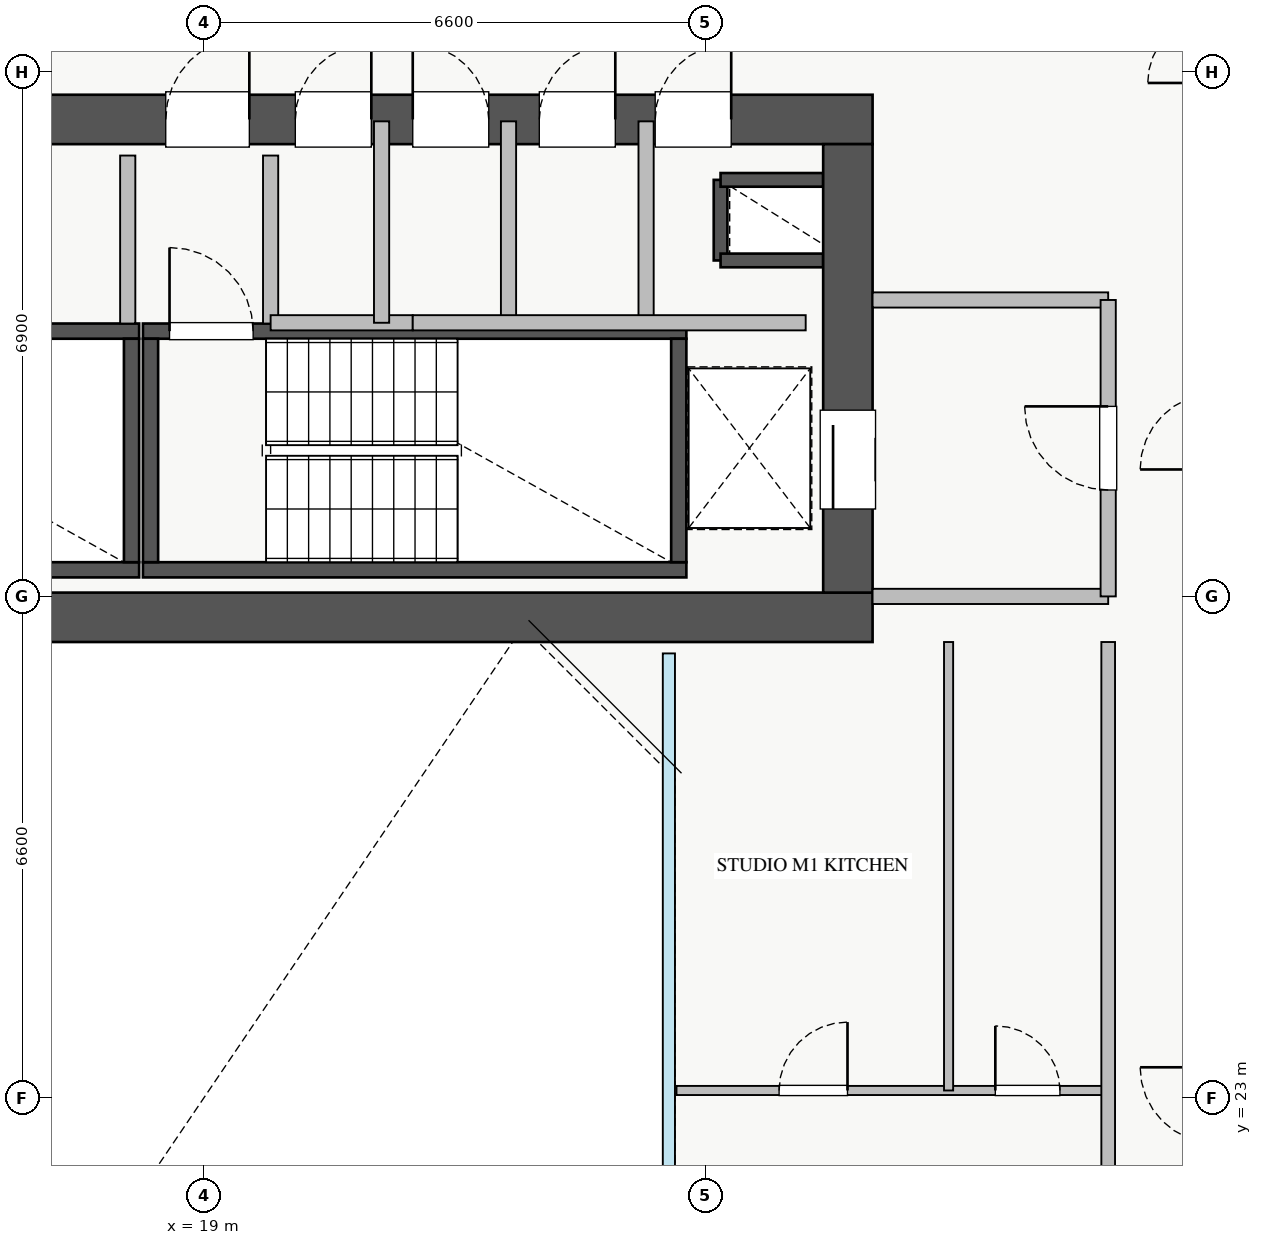
"""IFC4 building model, lengths in metres.
Left out: names, types, materials, properties, quantities, classifications, styles, units other than length and angle.
Written with IfcOpenShell. Run it as: python <this file> out.ifc"""

import sys

from ifc_helpers import new_model, si_unit, direction, frame, frame_2d, origin, place, context, subcontext, project, spatial, rectangle, extrude, source, transform, mapped, element, fill, save


model = new_model("IFC4")
c1 = context("Model", 3, precision=1e-05, world=origin(), true_north=direction((0.0, 1.0)))
c2 = subcontext(c1, "Body", "Model", "MODEL_VIEW")
j1 = project(units=[si_unit("LENGTHUNIT", "METRE"), si_unit("PLANEANGLEUNIT", "RADIAN")], contexts=[c1])
p1 = place(None, origin())
s1 = spatial("IfcSite", under=j1, at=p1, CompositionType="ELEMENT")
p2 = place(p1, origin())
s2 = spatial("IfcBuilding", under=s1, at=p2, CompositionType="ELEMENT")
p3 = place(p2, frame((0.0, 0.0, 173.0)))
s3 = spatial("IfcBuildingStorey", under=s2, at=p3, CompositionType="ELEMENT", Elevation=173.0)
p4 = place(p3, frame((25.8, 34.02, 0.0), z_axis=(0.0, 0.0, 1.0), x_axis=(0.0, 1.0, 0.0)))
e1 = element("IfcWall", 1, at=p4, inside=s3, PredefinedType="SHEAR", context=c2, shape_type="SweptSolid", body=[
    extrude(rectangle(XDim=1.06, YDim=0.18, at=frame_2d((0.53, 0.0))), origin(), (0.0, 0.0, 1.0), 3.0),
])
for number, where, z_axis, x_axis in (
    (2, (25.8, 35.08, 0.0), (0.0, 0.0, 1.0), (1.0, 0.0, 0.0)),
    (3, (25.8, 34.02, 0.0), (0.0, 0.0, 1.0), (1.0, 0.0, 0.0)),
):
    element("IfcWall", number, at=place(p3, frame(where, z_axis=z_axis, x_axis=x_axis)), inside=s3, PredefinedType="SHEAR", context=c2, shape_type="SweptSolid", body=[
        extrude(rectangle(XDim=1.35, YDim=0.18, at=frame_2d((0.675, 0.0))), origin(), (0.0, 0.0, 1.0), 3.0),
    ])
p5 = place(p3, frame((10.85, 29.95, 0.0), z_axis=(0.0, 0.0, 1.0), x_axis=(1.0, 0.0, 0.0)))
e4 = element("IfcWall", 4, at=p5, inside=s3, PredefinedType="SHEAR", context=c2, shape_type="SweptSolid", body=[
    extrude(rectangle(XDim=7.3, YDim=0.2, at=frame_2d((3.65, 0.0))), origin(), (0.0, 0.0, 1.0), 3.25),
])
p6 = place(p3, frame((10.85, 33.09, 0.0), z_axis=(0.0, 0.0, 1.0), x_axis=(1.0, 0.0, 0.0)))
e5 = element("IfcWall", 5, at=p6, inside=s3, PredefinedType="SHEAR", context=c2, shape_type="SweptSolid", body=[
    extrude(rectangle(XDim=7.3, YDim=0.2, at=frame_2d((3.65, 0.0))), origin(), (0.0, 0.0, 1.0), 3.25),
])
p7 = place(p6, frame((0.35, 0.0, 0.0)))
e6 = element("IfcOpeningElement", 6, at=p7, cuts=e5, PredefinedType="OPENING", context=c2, shape_type="SweptSolid", body=[
    extrude(rectangle(XDim=1.1, YDim=2.05, at=frame_2d((0.55, 1.025))), frame((0.0, 0.11, 0.0), z_axis=(0.0, -1.0, 0.0), x_axis=(1.0, 0.0, 0.0)), (0.0, 0.0, 1.0), 0.22),
])
p8 = place(p3, frame((18.05, 30.05, 0.0), z_axis=(0.0, 0.0, 1.0), x_axis=(0.0, 1.0, 0.0)))
e7 = element("IfcWall", 7, at=p8, inside=s3, PredefinedType="SHEAR", context=c2, shape_type="SweptSolid", body=[
    extrude(rectangle(XDim=2.94, YDim=0.2, at=frame_2d((1.47, 0.0))), origin(), (0.0, 0.0, 1.0), 3.25),
])
p9 = place(p3, frame((18.2, 29.95, 0.0), z_axis=(0.0, 0.0, 1.0), x_axis=(1.0, 0.0, 0.0)))
e8 = element("IfcWall", 8, at=p9, inside=s3, PredefinedType="SHEAR", context=c2, shape_type="SweptSolid", body=[
    extrude(rectangle(XDim=7.15, YDim=0.2, at=frame_2d((3.575, 0.0))), origin(), (0.0, 0.0, 1.0), 3.25),
])
p10 = place(p3, frame((18.2, 33.09, 0.0), z_axis=(0.0, 0.0, 1.0), x_axis=(1.0, 0.0, 0.0)))
e9 = element("IfcWall", 9, at=p10, inside=s3, PredefinedType="SHEAR", context=c2, shape_type="SweptSolid", body=[
    extrude(rectangle(XDim=7.15, YDim=0.2, at=frame_2d((3.575, 0.0))), origin(), (0.0, 0.0, 1.0), 3.25),
])
p11 = place(p10, frame((0.35, 0.0, 0.0)))
e10 = element("IfcOpeningElement", 10, at=p11, cuts=e9, PredefinedType="OPENING", context=c2, shape_type="SweptSolid", body=[
    extrude(rectangle(XDim=1.1, YDim=2.05, at=frame_2d((0.55, 1.025))), frame((0.0, 0.11, 0.0), z_axis=(0.0, -1.0, 0.0), x_axis=(1.0, 0.0, 0.0)), (0.0, 0.0, 1.0), 0.22),
])
for number, where, z_axis, x_axis in (
    (11, (18.3, 30.05, 0.0), (0.0, 0.0, 1.0), (0.0, 1.0, 0.0)),
    (12, (25.25, 30.05, 0.0), (0.0, 0.0, 1.0), (0.0, 1.0, 0.0)),
):
    element("IfcWall", number, at=place(p3, frame(where, z_axis=z_axis, x_axis=x_axis)), inside=s3, PredefinedType="SHEAR", context=c2, shape_type="SweptSolid", body=[
        extrude(rectangle(XDim=2.94, YDim=0.2, at=frame_2d((1.47, 0.0))), origin(), (0.0, 0.0, 1.0), 3.25),
    ])
p12 = place(p3, frame((10.2, 29.325, 0.0), z_axis=(0.0, 0.0, 1.0), x_axis=(1.0, 0.0, 0.0)))
e13 = element("IfcWall", 13, at=p12, inside=s3, PredefinedType="SHEAR", context=c2, shape_type="SweptSolid", body=[
    extrude(rectangle(XDim=17.6, YDim=0.65, at=frame_2d((8.8, 0.0))), origin(), (0.0, 0.0, 1.0), 3.25),
])
p13 = place(p3, frame((10.2, 35.875, 0.0), z_axis=(0.0, 0.0, 1.0), x_axis=(1.0, 0.0, 0.0)))
e14 = element("IfcWall", 14, at=p13, inside=s3, PredefinedType="SHEAR", context=c2, shape_type="SweptSolid", body=[
    extrude(rectangle(XDim=17.6, YDim=0.65, at=frame_2d((8.8, 0.0))), origin(), (0.0, 0.0, 1.0), 3.25),
])
p14 = place(p13, frame((1.15, 0.0, 0.0)))
e15 = element("IfcOpeningElement", 15, at=p14, cuts=e14, PredefinedType="OPENING", context=c2, shape_type="SweptSolid", body=[
    extrude(rectangle(XDim=1.1, YDim=2.05, at=frame_2d((0.55, 1.025))), frame((0.0, 0.335, 0.0), z_axis=(0.0, -1.0, 0.0), x_axis=(1.0, 0.0, 0.0)), (0.0, 0.0, 1.0), 0.67),
])
p15 = place(p13, frame((8.3, 0.0, 0.0)))
e16 = element("IfcOpeningElement", 16, at=p15, cuts=e14, PredefinedType="OPENING", context=c2, shape_type="SweptSolid", body=[
    extrude(rectangle(XDim=1.1, YDim=2.05, at=frame_2d((0.55, 1.025))), frame((0.0, 0.335, 0.0), z_axis=(0.0, -1.0, 0.0), x_axis=(1.0, 0.0, 0.0)), (0.0, 0.0, 1.0), 0.67),
])
p16 = place(p13, frame((4.9, 0.0, 0.0)))
e17 = element("IfcOpeningElement", 17, at=p16, cuts=e14, PredefinedType="OPENING", context=c2, shape_type="SweptSolid", body=[
    extrude(rectangle(XDim=1.1, YDim=2.05, at=frame_2d((0.55, 1.025))), frame((0.0, 0.335, 0.0), z_axis=(0.0, -1.0, 0.0), x_axis=(1.0, 0.0, 0.0)), (0.0, 0.0, 1.0), 0.67),
])
p17 = place(p13, frame((14.74, 0.0, 0.0)))
e18 = element("IfcOpeningElement", 18, at=p17, cuts=e14, PredefinedType="OPENING", context=c2, shape_type="SweptSolid", body=[
    extrude(rectangle(XDim=1.0, YDim=2.05, at=frame_2d((0.5, 1.025))), frame((0.0, 0.335, 0.0), z_axis=(0.0, -1.0, 0.0), x_axis=(1.0, 0.0, 0.0)), (0.0, 0.0, 1.0), 0.67),
])
p18 = place(p13, frame((10.005, 0.0, 0.0)))
e19 = element("IfcOpeningElement", 19, at=p18, cuts=e14, PredefinedType="OPENING", context=c2, shape_type="SweptSolid", body=[
    extrude(rectangle(XDim=1.0, YDim=2.05, at=frame_2d((0.5, 1.025))), frame((0.0, 0.335, 0.0), z_axis=(0.0, -1.0, 0.0), x_axis=(1.0, 0.0, 0.0)), (0.0, 0.0, 1.0), 0.67),
])
p19 = place(p13, frame((11.55, 0.0, 0.0)))
e20 = element("IfcOpeningElement", 20, at=p19, cuts=e14, PredefinedType="OPENING", context=c2, shape_type="SweptSolid", body=[
    extrude(rectangle(XDim=1.0, YDim=2.05, at=frame_2d((0.5, 1.025))), frame((0.0, 0.335, 0.0), z_axis=(0.0, -1.0, 0.0), x_axis=(1.0, 0.0, 0.0)), (0.0, 0.0, 1.0), 0.67),
])
p20 = place(p13, frame((13.215, 0.0, 0.0)))
e21 = element("IfcOpeningElement", 21, at=p20, cuts=e14, PredefinedType="OPENING", context=c2, shape_type="SweptSolid", body=[
    extrude(rectangle(XDim=1.0, YDim=2.05, at=frame_2d((0.5, 1.025))), frame((0.0, 0.335, 0.0), z_axis=(0.0, -1.0, 0.0), x_axis=(1.0, 0.0, 0.0)), (0.0, 0.0, 1.0), 0.67),
])
p21 = place(p3, frame((27.475, 29.65, 0.0), z_axis=(0.0, 0.0, 1.0), x_axis=(0.0, 1.0, 0.0)))
e22 = element("IfcWall", 22, at=p21, inside=s3, PredefinedType="SHEAR", context=c2, shape_type="SweptSolid", body=[
    extrude(rectangle(XDim=5.9, YDim=0.65, at=frame_2d((2.95, 0.0))), origin(), (0.0, 0.0, 1.0), 3.25),
])
p22 = place(p21, frame((1.1, 0.0, 0.0)))
e23 = element("IfcOpeningElement", 23, at=p22, cuts=e22, PredefinedType="OPENING", context=c2, shape_type="SweptSolid", body=[
    extrude(rectangle(XDim=1.3, YDim=2.05, at=frame_2d((0.65, 1.025))), frame((0.0, 0.335, 0.0), z_axis=(0.0, -1.0, 0.0), x_axis=(1.0, 0.0, 0.0)), (0.0, 0.0, 1.0), 0.67),
])
for number, where, z_axis, x_axis in (
    (24, (27.8, 29.6, 0.0), (0.0, 0.0, 1.0), (1.0, 0.0, 0.0)),
    (25, (27.8, 33.5, 0.0), (0.0, 0.0, 1.0), (1.0, 0.0, 0.0)),
):
    element("IfcWall", number, at=place(p3, frame(where, z_axis=z_axis, x_axis=x_axis)), inside=s3, PredefinedType="PARTITIONING", context=c2, shape_type="SweptSolid", body=[
        extrude(rectangle(XDim=3.1, YDim=0.2, at=frame_2d((1.55, 0.0))), origin(), (0.0, 0.0, 1.0), 3.0),
    ])
p23 = place(p3, frame((30.9, 29.6, 0.0), z_axis=(0.0, 0.0, 1.0), x_axis=(0.0, 1.0, 0.0)))
e26 = element("IfcWall", 26, at=p23, inside=s3, PredefinedType="PARTITIONING", context=c2, shape_type="SweptSolid", body=[
    extrude(rectangle(XDim=3.9, YDim=0.2, at=frame_2d((1.95, 0.0))), origin(), (0.0, 0.0, 1.0), 3.0),
])
p24 = place(p23, frame((1.4, 0.0, 0.0)))
e27 = element("IfcOpeningElement", 27, at=p24, cuts=e26, PredefinedType="OPENING", context=c2, shape_type="SweptSolid", body=[
    extrude(rectangle(XDim=1.1, YDim=2.05, at=frame_2d((0.55, 1.025))), frame((0.0, 0.11, 0.0), z_axis=(0.0, -1.0, 0.0), x_axis=(1.0, 0.0, 0.0)), (0.0, 0.0, 1.0), 0.22),
])
for number, where, z_axis, x_axis in (
    (28, (18.0, 33.19, 0.0), (0.0, 0.0, 1.0), (0.0, 1.0, 0.0)),
    (29, (19.88, 33.19, 0.0), (0.0, 0.0, 1.0), (0.0, 1.0, 0.0)),
):
    element("IfcWall", number, at=place(p3, frame(where, z_axis=z_axis, x_axis=x_axis)), inside=s3, PredefinedType="PARTITIONING", context=c2, shape_type="SweptSolid", body=[
        extrude(rectangle(XDim=2.21, YDim=0.2, at=frame_2d((1.105, 0.0))), origin(), (0.0, 0.0, 1.0), 3.0),
    ])
p25 = place(p3, frame((24.82, 33.2, 0.0), z_axis=(0.0, 0.0, 1.0), x_axis=(0.0, 1.0, 0.0)))
e30 = element("IfcWall", 30, at=p25, inside=s3, PredefinedType="PARTITIONING", context=c2, shape_type="SweptSolid", body=[
    extrude(rectangle(XDim=2.65, YDim=0.2, at=frame_2d((1.325, 0.0))), origin(), (0.0, 0.0, 1.0), 3.0),
])
p26 = place(p3, frame((19.88, 33.2, 0.0), z_axis=(0.0, 0.0, 1.0), x_axis=(1.0, 0.0, 0.0)))
e31 = element("IfcWall", 31, at=p26, inside=s3, PredefinedType="PARTITIONING", context=c2, shape_type="SweptSolid", body=[
    extrude(rectangle(XDim=1.87, YDim=0.2, at=frame_2d((0.935, 0.0))), origin(), (0.0, 0.0, 1.0), 3.0),
])
for number, where, z_axis, x_axis in (
    (32, (21.34, 33.2, 0.0), (0.0, 0.0, 1.0), (0.0, 1.0, 0.0)),
    (33, (23.01, 33.2, 0.0), (0.0, 0.0, 1.0), (0.0, 1.0, 0.0)),
):
    element("IfcWall", number, at=place(p3, frame(where, z_axis=z_axis, x_axis=x_axis)), inside=s3, PredefinedType="PARTITIONING", context=c2, shape_type="SweptSolid", body=[
        extrude(rectangle(XDim=2.65, YDim=0.2, at=frame_2d((1.325, 0.0))), origin(), (0.0, 0.0, 1.0), 3.0),
    ])
p27 = place(p3, frame((21.75, 33.2, 0.0), z_axis=(0.0, 0.0, 1.0), x_axis=(1.0, 0.0, 0.0)))
e34 = element("IfcWall", 34, at=p27, inside=s3, PredefinedType="PARTITIONING", context=c2, shape_type="SweptSolid", body=[
    extrude(rectangle(XDim=5.17, YDim=0.2, at=frame_2d((2.585, 0.0))), origin(), (0.0, 0.0, 1.0), 3.0),
])
p28 = place(p3, frame((25.22, 23.1, 0.0), z_axis=(0.0, 0.0, 1.0), x_axis=(1.0, 0.0, 0.0)))
e35 = element("IfcWall", 35, at=p28, inside=s3, PredefinedType="PLUMBINGWALL", context=c2, shape_type="SweptSolid", body=[
    extrude(rectangle(XDim=5.68, YDim=0.12, at=frame_2d((2.84, 0.0))), origin(), (0.0, 0.0, 1.0), 3.0),
])
p29 = place(p28, frame((1.35, 0.0, 0.0)))
e36 = element("IfcOpeningElement", 36, at=p29, cuts=e35, PredefinedType="OPENING", context=c2, shape_type="SweptSolid", body=[
    extrude(rectangle(XDim=0.9, YDim=2.05, at=frame_2d((0.45, 1.025))), frame((0.0, 0.07, 0.0), z_axis=(0.0, -1.0, 0.0), x_axis=(1.0, 0.0, 0.0)), (0.0, 0.0, 1.0), 0.14),
])
p30 = place(p28, frame((4.195, 0.0, 0.0)))
e37 = element("IfcOpeningElement", 37, at=p30, cuts=e35, PredefinedType="OPENING", context=c2, shape_type="SweptSolid", body=[
    extrude(rectangle(XDim=0.85, YDim=2.05, at=frame_2d((0.425, 1.025))), frame((0.0, 0.07, 0.0), z_axis=(0.0, -1.0, 0.0), x_axis=(1.0, 0.0, 0.0)), (0.0, 0.0, 1.0), 0.14),
])
p31 = place(p3, frame((28.8, 23.1, 0.0), z_axis=(0.0, 0.0, 1.0), x_axis=(0.0, 1.0, 0.0)))
e38 = element("IfcWall", 38, at=p31, inside=s3, PredefinedType="PLUMBINGWALL", context=c2, shape_type="SweptSolid", body=[
    extrude(rectangle(XDim=5.9, YDim=0.12, at=frame_2d((2.95, 0.0))), origin(), (0.0, 0.0, 1.0), 3.0),
])
p32 = place(p3, frame((30.9, 17.0, 0.0), z_axis=(0.0, 0.0, 1.0), x_axis=(0.0, 1.0, 0.0)))
e39 = element("IfcWall", 39, at=p32, inside=s3, PredefinedType="PARTITIONING", context=c2, shape_type="SweptSolid", body=[
    extrude(rectangle(XDim=12.0, YDim=0.18, at=frame_2d((6.0, 0.0))), origin(), (0.0, 0.0, 1.0), 3.0),
])
p33 = place(p32, frame((2.36, 0.0, 0.0)))
e40 = element("IfcOpeningElement", 40, at=p33, cuts=e39, PredefinedType="OPENING", context=c2, shape_type="SweptSolid", body=[
    extrude(rectangle(XDim=1.0, YDim=2.05, at=frame_2d((0.5, 1.025))), frame((0.0, 0.1, 0.0), z_axis=(0.0, -1.0, 0.0), x_axis=(1.0, 0.0, 0.0)), (0.0, 0.0, 1.0), 0.2),
])
m1 = source(origin(), c2, "Body", "SweptSolid", [
    extrude(rectangle(XDim=1.3, YDim=2.05, at=frame_2d((0.65, 1.025))), frame((0.0, 0.025, 0.0), z_axis=(0.0, -1.0, 0.0), x_axis=(1.0, 0.0, 0.0)), (0.0, 0.0, 1.0), 0.05),
])
p34 = place(p22, origin())
e41 = element("IfcDoor", 41, at=p34, inside=s3, OperationType="SLIDING_TO_LEFT", PredefinedType="DOOR", context=c2, shape_type="MappedRepresentation", body=[
    mapped(m1, transform((0.0, 0.0, 0.0), x_axis=(1.0, 0.0, 0.0), y_axis=(0.0, 1.0, 0.0), z_axis=(0.0, 0.0, 1.0), scale=1.0)),
])
fill(e23, e41)
m2 = source(origin(), c2, "Body", "SweptSolid", [
    extrude(rectangle(XDim=1.1, YDim=2.05, at=frame_2d((0.55, 1.025))), frame((0.0, 0.025, 0.0), z_axis=(0.0, -1.0, 0.0), x_axis=(1.0, 0.0, 0.0)), (0.0, 0.0, 1.0), 0.05),
])
p35 = place(p15, origin())
e42 = element("IfcDoor", 42, at=p35, inside=s3, OperationType="SINGLE_SWING_RIGHT", PredefinedType="DOOR", context=c2, shape_type="MappedRepresentation", body=[
    mapped(m2, transform((0.0, 0.0, 0.0), x_axis=(1.0, 0.0, 0.0), y_axis=(0.0, 1.0, 0.0), z_axis=(0.0, 0.0, 1.0), scale=1.0)),
])
fill(e16, e42)
p36 = place(p11, origin())
e43 = element("IfcDoor", 43, at=p36, inside=s3, OperationType="SINGLE_SWING_LEFT", PredefinedType="DOOR", context=c2, shape_type="MappedRepresentation", body=[
    mapped(m2, transform((0.0, 0.0, 0.0), x_axis=(1.0, 0.0, 0.0), y_axis=(0.0, 1.0, 0.0), z_axis=(0.0, 0.0, 1.0), scale=1.0)),
])
fill(e10, e43)
m3 = source(origin(), c2, "Body", "SweptSolid", [
    extrude(rectangle(XDim=1.0, YDim=2.05, at=frame_2d((0.5, 1.025))), frame((0.0, 0.025, 0.0), z_axis=(0.0, -1.0, 0.0), x_axis=(1.0, 0.0, 0.0)), (0.0, 0.0, 1.0), 0.05),
])
p37 = place(p17, origin())
e44 = element("IfcDoor", 44, at=p37, inside=s3, OperationType="SINGLE_SWING_RIGHT", PredefinedType="DOOR", context=c2, shape_type="MappedRepresentation", body=[
    mapped(m3, transform((0.0, 0.0, 0.0), x_axis=(1.0, 0.0, 0.0), y_axis=(0.0, 1.0, 0.0), z_axis=(0.0, 0.0, 1.0), scale=1.0)),
])
fill(e18, e44)
p38 = place(p18, origin())
e45 = element("IfcDoor", 45, at=p38, inside=s3, OperationType="SINGLE_SWING_RIGHT", PredefinedType="DOOR", context=c2, shape_type="MappedRepresentation", body=[
    mapped(m3, transform((0.0, 0.0, 0.0), x_axis=(1.0, 0.0, 0.0), y_axis=(0.0, 1.0, 0.0), z_axis=(0.0, 0.0, 1.0), scale=1.0)),
])
fill(e19, e45)
p39 = place(p19, origin())
e46 = element("IfcDoor", 46, at=p39, inside=s3, OperationType="SINGLE_SWING_LEFT", PredefinedType="DOOR", context=c2, shape_type="MappedRepresentation", body=[
    mapped(m3, transform((0.0, 0.0, 0.0), x_axis=(1.0, 0.0, 0.0), y_axis=(0.0, 1.0, 0.0), z_axis=(0.0, 0.0, 1.0), scale=1.0)),
])
fill(e20, e46)
p40 = place(p20, origin())
e47 = element("IfcDoor", 47, at=p40, inside=s3, OperationType="SINGLE_SWING_RIGHT", PredefinedType="DOOR", context=c2, shape_type="MappedRepresentation", body=[
    mapped(m3, transform((0.0, 0.0, 0.0), x_axis=(1.0, 0.0, 0.0), y_axis=(0.0, 1.0, 0.0), z_axis=(0.0, 0.0, 1.0), scale=1.0)),
])
fill(e21, e47)
p41 = place(p24, origin())
e48 = element("IfcDoor", 48, at=p41, inside=s3, OperationType="SINGLE_SWING_RIGHT", PredefinedType="DOOR", context=c2, shape_type="MappedRepresentation", body=[
    mapped(m2, transform((0.0, 0.0, 0.0), x_axis=(1.0, 0.0, 0.0), y_axis=(0.0, 1.0, 0.0), z_axis=(0.0, 0.0, 1.0), scale=1.0)),
])
fill(e27, e48)
m4 = source(origin(), c2, "Body", "SweptSolid", [
    extrude(rectangle(XDim=0.9, YDim=2.05, at=frame_2d((0.45, 1.025))), frame((0.0, 0.025, 0.0), z_axis=(0.0, -1.0, 0.0), x_axis=(1.0, 0.0, 0.0)), (0.0, 0.0, 1.0), 0.05),
])
p42 = place(p29, origin())
e49 = element("IfcDoor", 49, at=p42, inside=s3, OperationType="SINGLE_SWING_RIGHT", PredefinedType="DOOR", context=c2, shape_type="MappedRepresentation", body=[
    mapped(m4, transform((0.0, 0.0, 0.0), x_axis=(1.0, 0.0, 0.0), y_axis=(0.0, 1.0, 0.0), z_axis=(0.0, 0.0, 1.0), scale=1.0)),
])
fill(e36, e49)
m5 = source(origin(), c2, "Body", "SweptSolid", [
    extrude(rectangle(XDim=0.85, YDim=2.05, at=frame_2d((0.425, 1.025))), frame((0.0, 0.025, 0.0), z_axis=(0.0, -1.0, 0.0), x_axis=(1.0, 0.0, 0.0)), (0.0, 0.0, 1.0), 0.05),
])
p43 = place(p30, origin())
e50 = element("IfcDoor", 50, at=p43, inside=s3, OperationType="SINGLE_SWING_LEFT", PredefinedType="DOOR", context=c2, shape_type="MappedRepresentation", body=[
    mapped(m5, transform((0.0, 0.0, 0.0), x_axis=(1.0, 0.0, 0.0), y_axis=(0.0, 1.0, 0.0), z_axis=(0.0, 0.0, 1.0), scale=1.0)),
])
fill(e37, e50)
save(model, sys.argv[1])
